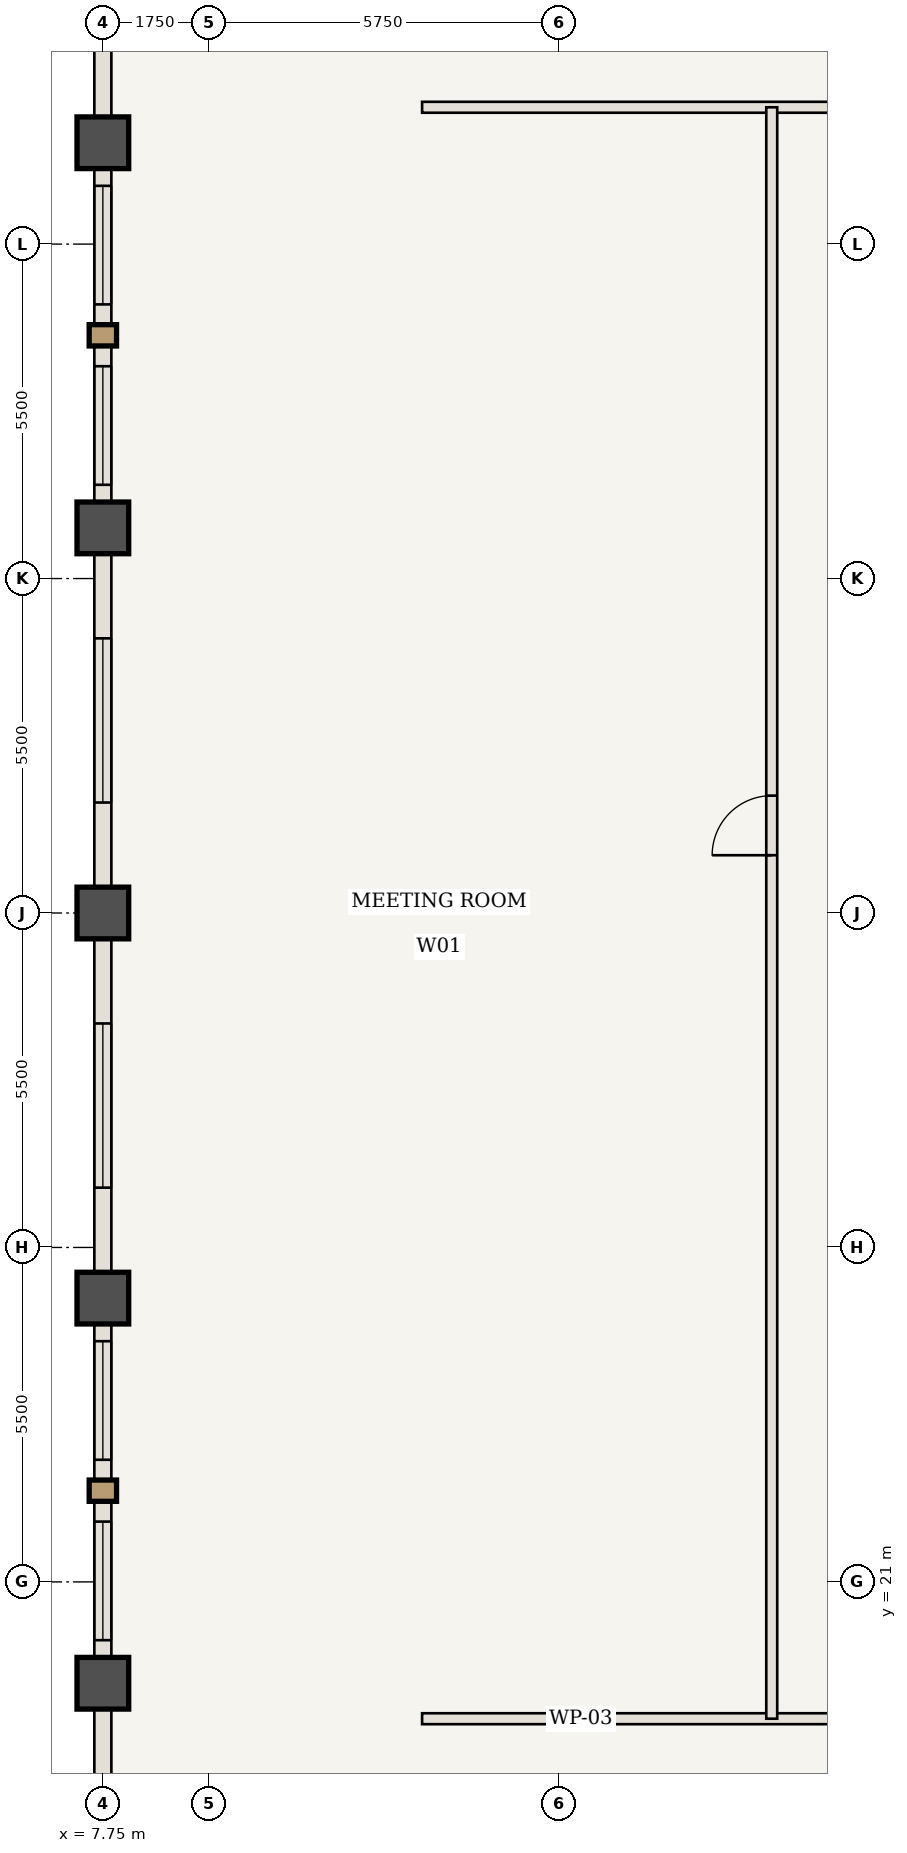
"""IFC4 building model, lengths in metres.
Left out: names, types, materials, properties, quantities, classifications, styles, units other than length and angle.
Written with IfcOpenShell. Run it as: python <this file> out.ifc"""

import sys

from ifc_helpers import new_model, si_unit, direction, frame, frame_2d, origin, origin_2d, place, context, subcontext, project, spatial, rectangle, extrude, element, fill, save


model = new_model("IFC4")
c1 = context("Model", 3, precision=1e-05, world=origin(), true_north=direction((0.0, 1.0)))
c2 = subcontext(c1, "Body", "Model", "MODEL_VIEW")
j1 = project(units=[si_unit("LENGTHUNIT", "METRE"), si_unit("PLANEANGLEUNIT", "RADIAN")], contexts=[c1])
p1 = place(None, origin())
s1 = spatial("IfcSite", under=j1, at=p1, CompositionType="ELEMENT")
p2 = place(p1, origin())
s2 = spatial("IfcBuilding", under=s1, at=p2, CompositionType="ELEMENT")
p3 = place(p2, frame((0.0, 0.0, 240.8)))
s3 = spatial("IfcBuildingStorey", under=s2, at=p3, CompositionType="ELEMENT", Elevation=240.8)
for number, where, z_axis, x_axis in (
    (1, (7.75, 19.333, 0.0), (0.0, 0.0, 1.0), (1.0, 0.0, 0.0)),
    (2, (7.75, 25.667, 0.0), (0.0, 0.0, 1.0), (1.0, 0.0, 0.0)),
    (3, (7.75, 32.0, 0.0), (0.0, 0.0, 1.0), (1.0, 0.0, 0.0)),
    (4, (7.75, 38.333, 0.0), (0.0, 0.0, 1.0), (1.0, 0.0, 0.0)),
    (5, (7.75, 44.667, 0.0), (0.0, 0.0, 1.0), (1.0, 0.0, 0.0)),
):
    element("IfcColumn", number, at=place(p3, frame(where, z_axis=z_axis, x_axis=x_axis)), inside=s3, PredefinedType="COLUMN", context=c2, shape_type="SweptSolid", body=[
        extrude(rectangle(XDim=0.85, YDim=0.85, at=origin_2d()), origin(), (0.0, 0.0, 1.0), 3.85),
    ])
p4 = place(p3, frame((13.0, 18.75, 0.0), z_axis=(0.0, 0.0, 1.0), x_axis=(1.0, 0.0, 0.0)))
e6 = element("IfcWall", 6, at=p4, inside=s3, PredefinedType="STANDARD", context=c2, shape_type="SweptSolid", body=[
    extrude(rectangle(XDim=11.867, YDim=0.18, at=frame_2d((5.933, 0.0))), origin(), (0.0, 0.0, 1.0), 3.685),
])
p5 = place(p4, frame((6.858, 0.0, 0.0)))
e7 = element("IfcOpeningElement", 7, at=p5, cuts=e6, PredefinedType="OPENING", context=c2, shape_type="SweptSolid", body=[
    extrude(rectangle(XDim=0.98, YDim=2.2, at=frame_2d((0.49, 1.1))), frame((0.0, 0.1, 0.0), z_axis=(0.0, -1.0, 0.0), x_axis=(1.0, 0.0, 0.0)), (0.0, 0.0, 1.0), 0.2),
])
p6 = place(p3, frame((13.0, 45.25, 0.0), z_axis=(0.0, 0.0, 1.0), x_axis=(1.0, 0.0, 0.0)))
e8 = element("IfcWall", 8, at=p6, inside=s3, PredefinedType="STANDARD", context=c2, shape_type="SweptSolid", body=[
    extrude(rectangle(XDim=19.6, YDim=0.18, at=frame_2d((9.8, 0.0))), origin(), (0.0, 0.0, 1.0), 3.685),
])
p7 = place(p6, frame((12.175, 0.0, 0.0)))
e9 = element("IfcOpeningElement", 9, at=p7, cuts=e8, PredefinedType="OPENING", context=c2, shape_type="SweptSolid", body=[
    extrude(rectangle(XDim=0.98, YDim=2.2, at=frame_2d((0.49, 1.1))), frame((0.0, 0.1, 0.0), z_axis=(0.0, -1.0, 0.0), x_axis=(1.0, 0.0, 0.0)), (0.0, 0.0, 1.0), 0.2),
])
p8 = place(p3, frame((18.75, 18.75, 0.0), z_axis=(0.0, 0.0, 1.0), x_axis=(0.0, 1.0, 0.0)))
e10 = element("IfcWall", 10, at=p8, inside=s3, PredefinedType="STANDARD", context=c2, shape_type="SweptSolid", body=[
    extrude(rectangle(XDim=26.5, YDim=0.18, at=frame_2d((13.25, 0.0))), origin(), (0.0, 0.0, 1.0), 3.685),
])
p9 = place(p8, frame((14.2, 0.0, 0.0)))
e11 = element("IfcOpeningElement", 11, at=p9, cuts=e10, PredefinedType="OPENING", context=c2, shape_type="SweptSolid", body=[
    extrude(rectangle(XDim=0.98, YDim=2.2, at=frame_2d((0.49, 1.1))), frame((0.0, 0.1, 0.0), z_axis=(0.0, -1.0, 0.0), x_axis=(1.0, 0.0, 0.0)), (0.0, 0.0, 1.0), 0.2),
])
p10 = place(p3, frame((7.75, 13.0, 0.0), z_axis=(0.0, 0.0, 1.0), x_axis=(0.0, 1.0, 0.0)))
e12 = element("IfcWall", 12, at=p10, inside=s3, PredefinedType="USERDEFINED", context=c2, shape_type="SweptSolid", body=[
    extrude(rectangle(XDim=6.333, YDim=0.28, at=frame_2d((3.167, 0.0))), origin(), (0.0, 0.0, 1.0), 2.985),
])
p11 = place(p3, frame((7.75, 19.333, 0.0), z_axis=(0.0, 0.0, 1.0), x_axis=(0.0, 1.0, 0.0)))
e13 = element("IfcWall", 13, at=p11, inside=s3, PredefinedType="USERDEFINED", context=c2, shape_type="SweptSolid", body=[
    extrude(rectangle(XDim=6.333, YDim=0.28, at=frame_2d((3.167, 0.0))), origin(), (0.0, 0.0, 1.0), 2.985),
])
p12 = place(p11, frame((0.708, 0.0, 0.85)))
e14 = element("IfcOpeningElement", 14, at=p12, cuts=e13, PredefinedType="OPENING", context=c2, shape_type="SweptSolid", body=[
    extrude(rectangle(XDim=1.95, YDim=1.935, at=frame_2d((0.975, 0.968))), frame((0.0, 0.15, 0.0), z_axis=(0.0, -1.0, 0.0), x_axis=(1.0, 0.0, 0.0)), (0.0, 0.0, 1.0), 0.3),
])
p13 = place(p11, frame((3.675, 0.0, 0.85)))
e15 = element("IfcOpeningElement", 15, at=p13, cuts=e13, PredefinedType="OPENING", context=c2, shape_type="SweptSolid", body=[
    extrude(rectangle(XDim=1.95, YDim=1.935, at=frame_2d((0.975, 0.968))), frame((0.0, 0.15, 0.0), z_axis=(0.0, -1.0, 0.0), x_axis=(1.0, 0.0, 0.0)), (0.0, 0.0, 1.0), 0.3),
])
p14 = place(p3, frame((7.75, 25.667, 0.0), z_axis=(0.0, 0.0, 1.0), x_axis=(0.0, 1.0, 0.0)))
e16 = element("IfcWall", 16, at=p14, inside=s3, PredefinedType="USERDEFINED", context=c2, shape_type="SweptSolid", body=[
    extrude(rectangle(XDim=6.333, YDim=0.28, at=frame_2d((3.167, 0.0))), origin(), (0.0, 0.0, 1.0), 2.985),
])
p15 = place(p14, frame((1.817, 0.0, 0.85)))
e17 = element("IfcOpeningElement", 17, at=p15, cuts=e16, PredefinedType="OPENING", context=c2, shape_type="SweptSolid", body=[
    extrude(rectangle(XDim=2.7, YDim=1.935, at=frame_2d((1.35, 0.968))), frame((0.0, 0.15, 0.0), z_axis=(0.0, -1.0, 0.0), x_axis=(1.0, 0.0, 0.0)), (0.0, 0.0, 1.0), 0.3),
])
p16 = place(p3, frame((7.75, 32.0, 0.0), z_axis=(0.0, 0.0, 1.0), x_axis=(0.0, 1.0, 0.0)))
e18 = element("IfcWall", 18, at=p16, inside=s3, PredefinedType="USERDEFINED", context=c2, shape_type="SweptSolid", body=[
    extrude(rectangle(XDim=6.333, YDim=0.28, at=frame_2d((3.167, 0.0))), origin(), (0.0, 0.0, 1.0), 2.985),
])
p17 = place(p16, frame((1.817, 0.0, 0.85)))
e19 = element("IfcOpeningElement", 19, at=p17, cuts=e18, PredefinedType="OPENING", context=c2, shape_type="SweptSolid", body=[
    extrude(rectangle(XDim=2.7, YDim=1.935, at=frame_2d((1.35, 0.968))), frame((0.0, 0.15, 0.0), z_axis=(0.0, -1.0, 0.0), x_axis=(1.0, 0.0, 0.0)), (0.0, 0.0, 1.0), 0.3),
])
p18 = place(p3, frame((7.75, 38.333, 0.0), z_axis=(0.0, 0.0, 1.0), x_axis=(0.0, 1.0, 0.0)))
e20 = element("IfcWall", 20, at=p18, inside=s3, PredefinedType="USERDEFINED", context=c2, shape_type="SweptSolid", body=[
    extrude(rectangle(XDim=6.333, YDim=0.28, at=frame_2d((3.167, 0.0))), origin(), (0.0, 0.0, 1.0), 2.985),
])
p19 = place(p18, frame((0.708, 0.0, 0.85)))
e21 = element("IfcOpeningElement", 21, at=p19, cuts=e20, PredefinedType="OPENING", context=c2, shape_type="SweptSolid", body=[
    extrude(rectangle(XDim=1.95, YDim=1.935, at=frame_2d((0.975, 0.968))), frame((0.0, 0.15, 0.0), z_axis=(0.0, -1.0, 0.0), x_axis=(1.0, 0.0, 0.0)), (0.0, 0.0, 1.0), 0.3),
])
p20 = place(p18, frame((3.675, 0.0, 0.85)))
e22 = element("IfcOpeningElement", 22, at=p20, cuts=e20, PredefinedType="OPENING", context=c2, shape_type="SweptSolid", body=[
    extrude(rectangle(XDim=1.95, YDim=1.935, at=frame_2d((0.975, 0.968))), frame((0.0, 0.15, 0.0), z_axis=(0.0, -1.0, 0.0), x_axis=(1.0, 0.0, 0.0)), (0.0, 0.0, 1.0), 0.3),
])
p21 = place(p3, frame((7.75, 44.667, 0.0), z_axis=(0.0, 0.0, 1.0), x_axis=(0.0, 1.0, 0.0)))
e23 = element("IfcWall", 23, at=p21, inside=s3, PredefinedType="USERDEFINED", context=c2, shape_type="SweptSolid", body=[
    extrude(rectangle(XDim=6.333, YDim=0.28, at=frame_2d((3.167, 0.0))), origin(), (0.0, 0.0, 1.0), 2.985),
])
p22 = place(p9, origin())
e24 = element("IfcDoor", 24, at=p22, inside=s3, OperationType="SINGLE_SWING_LEFT", PredefinedType="DOOR", context=c2, shape_type="SweptSolid", body=[
    extrude(rectangle(XDim=0.98, YDim=2.2, at=frame_2d((0.49, 1.1))), frame((0.0, 0.025, 0.0), z_axis=(0.0, -1.0, 0.0), x_axis=(1.0, 0.0, 0.0)), (0.0, 0.0, 1.0), 0.05),
])
fill(e11, e24)
p23 = place(p12, origin())
e25 = element("IfcWindow", 25, at=p23, inside=s3, PartitioningType="SINGLE_PANEL", PredefinedType="WINDOW", context=c2, shape_type="SweptSolid", body=[
    extrude(rectangle(XDim=1.95, YDim=1.935, at=frame_2d((0.975, 0.968))), frame((0.0, 0.03, 0.0), z_axis=(0.0, -1.0, 0.0), x_axis=(1.0, 0.0, 0.0)), (0.0, 0.0, 1.0), 0.06),
])
fill(e14, e25)
p24 = place(p13, origin())
e26 = element("IfcWindow", 26, at=p24, inside=s3, PartitioningType="SINGLE_PANEL", PredefinedType="WINDOW", context=c2, shape_type="SweptSolid", body=[
    extrude(rectangle(XDim=1.95, YDim=1.935, at=frame_2d((0.975, 0.968))), frame((0.0, 0.03, 0.0), z_axis=(0.0, -1.0, 0.0), x_axis=(1.0, 0.0, 0.0)), (0.0, 0.0, 1.0), 0.06),
])
fill(e15, e26)
p25 = place(p15, origin())
e27 = element("IfcWindow", 27, at=p25, inside=s3, PartitioningType="SINGLE_PANEL", PredefinedType="WINDOW", context=c2, shape_type="SweptSolid", body=[
    extrude(rectangle(XDim=2.7, YDim=1.935, at=frame_2d((1.35, 0.968))), frame((0.0, 0.03, 0.0), z_axis=(0.0, -1.0, 0.0), x_axis=(1.0, 0.0, 0.0)), (0.0, 0.0, 1.0), 0.06),
])
fill(e17, e27)
p26 = place(p17, origin())
e28 = element("IfcWindow", 28, at=p26, inside=s3, PartitioningType="SINGLE_PANEL", PredefinedType="WINDOW", context=c2, shape_type="SweptSolid", body=[
    extrude(rectangle(XDim=2.7, YDim=1.935, at=frame_2d((1.35, 0.968))), frame((0.0, 0.03, 0.0), z_axis=(0.0, -1.0, 0.0), x_axis=(1.0, 0.0, 0.0)), (0.0, 0.0, 1.0), 0.06),
])
fill(e19, e28)
p27 = place(p19, origin())
e29 = element("IfcWindow", 29, at=p27, inside=s3, PartitioningType="SINGLE_PANEL", PredefinedType="WINDOW", context=c2, shape_type="SweptSolid", body=[
    extrude(rectangle(XDim=1.95, YDim=1.935, at=frame_2d((0.975, 0.968))), frame((0.0, 0.03, 0.0), z_axis=(0.0, -1.0, 0.0), x_axis=(1.0, 0.0, 0.0)), (0.0, 0.0, 1.0), 0.06),
])
fill(e21, e29)
p28 = place(p20, origin())
e30 = element("IfcWindow", 30, at=p28, inside=s3, PartitioningType="SINGLE_PANEL", PredefinedType="WINDOW", context=c2, shape_type="SweptSolid", body=[
    extrude(rectangle(XDim=1.95, YDim=1.935, at=frame_2d((0.975, 0.968))), frame((0.0, 0.03, 0.0), z_axis=(0.0, -1.0, 0.0), x_axis=(1.0, 0.0, 0.0)), (0.0, 0.0, 1.0), 0.06),
])
fill(e22, e30)
save(model, sys.argv[1])
